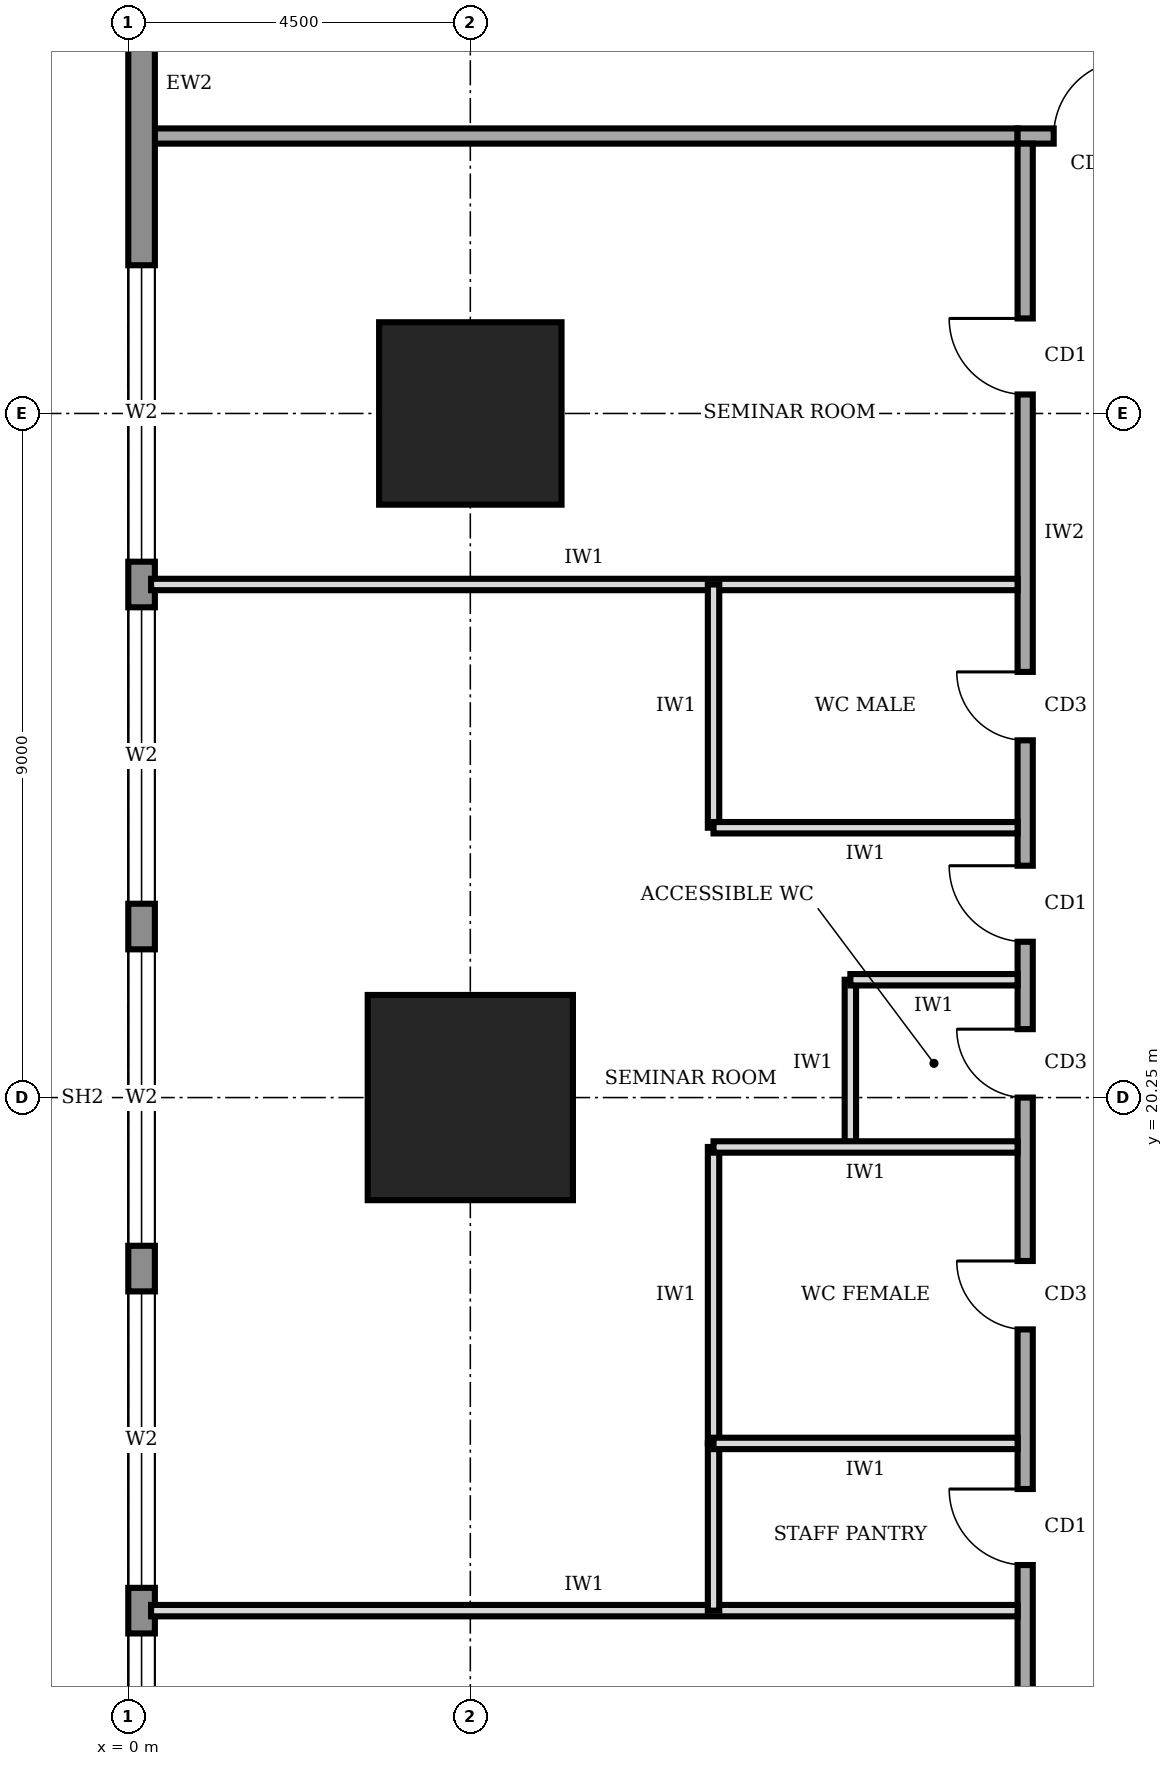
"""IFC4 building model, lengths in metres.
Left out: names, types, materials, properties, quantities, classifications, styles, units other than length and angle.
Written with IfcOpenShell. Run it as: python <this file> out.ifc"""

import sys

from ifc_helpers import new_model, si_unit, direction, frame, frame_2d, origin, origin_2d, place, context, subcontext, project, spatial, rectangle, extrude, element, fill, save


model = new_model("IFC4")
c1 = context("Model", 3, precision=1e-05, world=origin(), true_north=direction((0.0, 1.0)))
c2 = subcontext(c1, "Body", "Model", "MODEL_VIEW")
j1 = project(units=[si_unit("LENGTHUNIT", "METRE"), si_unit("PLANEANGLEUNIT", "RADIAN")], contexts=[c1])
p1 = place(None, origin())
s1 = spatial("IfcSite", under=j1, at=p1, CompositionType="ELEMENT")
p2 = place(p1, origin())
s2 = spatial("IfcBuilding", under=s1, at=p2, CompositionType="ELEMENT")
p3 = place(p2, frame((0.0, 0.0, 57.0)))
s3 = spatial("IfcBuildingStorey", under=s2, at=p3, CompositionType="ELEMENT", Elevation=57.0)
p4 = place(p3, frame((4.5, 20.25, 0.0), z_axis=(0.0, 0.0, 1.0), x_axis=(1.0, 0.0, 0.0)))
e1 = element("IfcColumn", 1, at=p4, inside=s3, PredefinedType="COLUMN", context=c2, shape_type="SweptSolid", body=[
    extrude(rectangle(XDim=2.7, YDim=2.7, at=origin_2d()), origin(), (0.0, 0.0, 1.0), 4.0),
])
p5 = place(p3, frame((4.5, 29.25, 0.0), z_axis=(0.0, 0.0, 1.0), x_axis=(1.0, 0.0, 0.0)))
e2 = element("IfcColumn", 2, at=p5, inside=s3, PredefinedType="COLUMN", context=c2, shape_type="SweptSolid", body=[
    extrude(rectangle(XDim=2.4, YDim=2.4, at=origin_2d()), origin(), (0.0, 0.0, 1.0), 4.0),
])
p6 = place(p3, frame((0.175, 35.98, 0.0), z_axis=(0.0, 0.0, 1.0), x_axis=(0.0, -1.0, 0.0)))
e3 = element("IfcWall", 3, at=p6, inside=s3, PredefinedType="STANDARD", context=c2, shape_type="SweptSolid", body=[
    extrude(rectangle(XDim=31.46, YDim=0.35, at=frame_2d((15.73, 0.0))), origin(), (0.0, 0.0, 1.0), 3.75),
])
p7 = place(p6, frame((27.21, 0.0, 0.6)))
e4 = element("IfcOpeningElement", 4, at=p7, cuts=e3, PredefinedType="OPENING", context=c2, shape_type="SweptSolid", body=[
    extrude(rectangle(XDim=3.9, YDim=2.6, at=frame_2d((1.95, 1.3))), frame((0.0, 0.185, 0.0), z_axis=(0.0, -1.0, 0.0), x_axis=(1.0, 0.0, 0.0)), (0.0, 0.0, 1.0), 0.37),
])
p8 = place(p6, frame((22.78, 0.0, 0.6)))
e5 = element("IfcOpeningElement", 5, at=p8, cuts=e3, PredefinedType="OPENING", context=c2, shape_type="SweptSolid", body=[
    extrude(rectangle(XDim=3.9, YDim=2.6, at=frame_2d((1.95, 1.3))), frame((0.0, 0.185, 0.0), z_axis=(0.0, -1.0, 0.0), x_axis=(1.0, 0.0, 0.0)), (0.0, 0.0, 1.0), 0.37),
])
p9 = place(p6, frame((18.28, 0.0, 0.6)))
e6 = element("IfcOpeningElement", 6, at=p9, cuts=e3, PredefinedType="OPENING", context=c2, shape_type="SweptSolid", body=[
    extrude(rectangle(XDim=3.9, YDim=2.6, at=frame_2d((1.95, 1.3))), frame((0.0, 0.185, 0.0), z_axis=(0.0, -1.0, 0.0), x_axis=(1.0, 0.0, 0.0)), (0.0, 0.0, 1.0), 0.37),
])
p10 = place(p6, frame((13.78, 0.0, 0.6)))
e7 = element("IfcOpeningElement", 7, at=p10, cuts=e3, PredefinedType="OPENING", context=c2, shape_type="SweptSolid", body=[
    extrude(rectangle(XDim=3.9, YDim=2.6, at=frame_2d((1.95, 1.3))), frame((0.0, 0.185, 0.0), z_axis=(0.0, -1.0, 0.0), x_axis=(1.0, 0.0, 0.0)), (0.0, 0.0, 1.0), 0.37),
])
p11 = place(p6, frame((9.28, 0.0, 0.6)))
e8 = element("IfcOpeningElement", 8, at=p11, cuts=e3, PredefinedType="OPENING", context=c2, shape_type="SweptSolid", body=[
    extrude(rectangle(XDim=3.9, YDim=2.6, at=frame_2d((1.95, 1.3))), frame((0.0, 0.185, 0.0), z_axis=(0.0, -1.0, 0.0), x_axis=(1.0, 0.0, 0.0)), (0.0, 0.0, 1.0), 0.37),
])
p12 = place(p6, frame((4.78, 0.0, 0.6)))
e9 = element("IfcOpeningElement", 9, at=p12, cuts=e3, PredefinedType="OPENING", context=c2, shape_type="SweptSolid", body=[
    extrude(rectangle(XDim=3.9, YDim=2.6, at=frame_2d((1.95, 1.3))), frame((0.0, 0.185, 0.0), z_axis=(0.0, -1.0, 0.0), x_axis=(1.0, 0.0, 0.0)), (0.0, 0.0, 1.0), 0.37),
])
p13 = place(p3, frame((28.6, 32.9, 0.0), z_axis=(0.0, 0.0, 1.0), x_axis=(-1.0, 0.0, 0.0)))
e10 = element("IfcWall", 10, at=p13, inside=s3, PredefinedType="SOLIDWALL", context=c2, shape_type="SweptSolid", body=[
    extrude(rectangle(XDim=16.9, YDim=0.2, at=frame_2d((8.45, 0.0))), origin(), (0.0, 0.0, 1.0), 3.75),
])
p14 = place(p13, frame((15.425, 0.0, 0.0)))
e11 = element("IfcOpeningElement", 11, at=p14, cuts=e10, PredefinedType="OPENING", context=c2, shape_type="SweptSolid", body=[
    extrude(rectangle(XDim=1.0, YDim=2.1, at=frame_2d((0.5, 1.05))), frame((0.0, 0.11, 0.0), z_axis=(0.0, -1.0, 0.0), x_axis=(1.0, 0.0, 0.0)), (0.0, 0.0, 1.0), 0.22),
])
p15 = place(p13, frame((12.35, 0.0, 0.0)))
e12 = element("IfcOpeningElement", 12, at=p15, cuts=e10, PredefinedType="OPENING", context=c2, shape_type="SweptSolid", body=[
    extrude(rectangle(XDim=1.0, YDim=2.1, at=frame_2d((0.5, 1.05))), frame((0.0, 0.11, 0.0), z_axis=(0.0, -1.0, 0.0), x_axis=(1.0, 0.0, 0.0)), (0.0, 0.0, 1.0), 0.22),
])
p16 = place(p13, frame((5.6, 0.0, 0.0)))
e13 = element("IfcOpeningElement", 13, at=p16, cuts=e10, PredefinedType="OPENING", context=c2, shape_type="SweptSolid", body=[
    extrude(rectangle(XDim=1.0, YDim=2.1, at=frame_2d((0.5, 1.05))), frame((0.0, 0.11, 0.0), z_axis=(0.0, -1.0, 0.0), x_axis=(1.0, 0.0, 0.0)), (0.0, 0.0, 1.0), 0.22),
])
p17 = place(p13, frame((0.275, 0.0, 0.0)))
e14 = element("IfcOpeningElement", 14, at=p17, cuts=e10, PredefinedType="OPENING", context=c2, shape_type="SweptSolid", body=[
    extrude(rectangle(XDim=1.0, YDim=2.1, at=frame_2d((0.5, 1.05))), frame((0.0, 0.11, 0.0), z_axis=(0.0, -1.0, 0.0), x_axis=(1.0, 0.0, 0.0)), (0.0, 0.0, 1.0), 0.22),
])
p18 = place(p3, frame((11.8, 32.8, 0.0), z_axis=(0.0, 0.0, 1.0), x_axis=(0.0, -1.0, 0.0)))
e15 = element("IfcWall", 15, at=p18, inside=s3, PredefinedType="SOLIDWALL", context=c2, shape_type="SweptSolid", body=[
    extrude(rectangle(XDim=23.8, YDim=0.2, at=frame_2d((11.9, 0.0))), origin(), (0.0, 0.0, 1.0), 3.75),
])
p19 = place(p18, frame((21.05, 0.0, 0.0)))
e16 = element("IfcOpeningElement", 16, at=p19, cuts=e15, PredefinedType="OPENING", context=c2, shape_type="SweptSolid", body=[
    extrude(rectangle(XDim=1.0, YDim=2.1, at=frame_2d((0.5, 1.05))), frame((0.0, 0.11, 0.0), z_axis=(0.0, -1.0, 0.0), x_axis=(1.0, 0.0, 0.0)), (0.0, 0.0, 1.0), 0.22),
])
p20 = place(p18, frame((17.7, 0.0, 0.0)))
e17 = element("IfcOpeningElement", 17, at=p20, cuts=e15, PredefinedType="OPENING", context=c2, shape_type="SweptSolid", body=[
    extrude(rectangle(XDim=1.0, YDim=2.1, at=frame_2d((0.5, 1.05))), frame((0.0, 0.11, 0.0), z_axis=(0.0, -1.0, 0.0), x_axis=(1.0, 0.0, 0.0)), (0.0, 0.0, 1.0), 0.22),
])
p21 = place(p18, frame((14.7, 0.0, 0.0)))
e18 = element("IfcOpeningElement", 18, at=p21, cuts=e15, PredefinedType="OPENING", context=c2, shape_type="SweptSolid", body=[
    extrude(rectangle(XDim=0.9, YDim=2.1, at=frame_2d((0.45, 1.05))), frame((0.0, 0.11, 0.0), z_axis=(0.0, -1.0, 0.0), x_axis=(1.0, 0.0, 0.0)), (0.0, 0.0, 1.0), 0.22),
])
p22 = place(p18, frame((11.65, 0.0, 0.0)))
e19 = element("IfcOpeningElement", 19, at=p22, cuts=e15, PredefinedType="OPENING", context=c2, shape_type="SweptSolid", body=[
    extrude(rectangle(XDim=0.9, YDim=2.1, at=frame_2d((0.45, 1.05))), frame((0.0, 0.11, 0.0), z_axis=(0.0, -1.0, 0.0), x_axis=(1.0, 0.0, 0.0)), (0.0, 0.0, 1.0), 0.22),
])
p23 = place(p18, frame((6.95, 0.0, 0.0)))
e20 = element("IfcOpeningElement", 20, at=p23, cuts=e15, PredefinedType="OPENING", context=c2, shape_type="SweptSolid", body=[
    extrude(rectangle(XDim=0.9, YDim=2.1, at=frame_2d((0.45, 1.05))), frame((0.0, 0.11, 0.0), z_axis=(0.0, -1.0, 0.0), x_axis=(1.0, 0.0, 0.0)), (0.0, 0.0, 1.0), 0.22),
])
p24 = place(p18, frame((9.5, 0.0, 0.0)))
e21 = element("IfcOpeningElement", 21, at=p24, cuts=e15, PredefinedType="OPENING", context=c2, shape_type="SweptSolid", body=[
    extrude(rectangle(XDim=1.0, YDim=2.1, at=frame_2d((0.5, 1.05))), frame((0.0, 0.11, 0.0), z_axis=(0.0, -1.0, 0.0), x_axis=(1.0, 0.0, 0.0)), (0.0, 0.0, 1.0), 0.22),
])
p25 = place(p18, frame((2.3, 0.0, 0.0)))
e22 = element("IfcOpeningElement", 22, at=p25, cuts=e15, PredefinedType="OPENING", context=c2, shape_type="SweptSolid", body=[
    extrude(rectangle(XDim=1.0, YDim=2.1, at=frame_2d((0.5, 1.05))), frame((0.0, 0.11, 0.0), z_axis=(0.0, -1.0, 0.0), x_axis=(1.0, 0.0, 0.0)), (0.0, 0.0, 1.0), 0.22),
])
p26 = place(p3, frame((0.3, 32.9, 0.0), z_axis=(0.0, 0.0, 1.0), x_axis=(1.0, 0.0, 0.0)))
e23 = element("IfcWall", 23, at=p26, inside=s3, PredefinedType="SOLIDWALL", context=c2, shape_type="SweptSolid", body=[
    extrude(rectangle(XDim=11.4, YDim=0.2, at=frame_2d((5.7, 0.0))), origin(), (0.0, 0.0, 1.0), 3.75),
])
for number, where, z_axis, x_axis in (
    (24, (0.3, 13.5, 0.0), (0.0, 0.0, 1.0), (1.0, 0.0, 0.0)),
    (25, (0.3, 27.0, 0.0), (0.0, 0.0, 1.0), (1.0, 0.0, 0.0)),
):
    element("IfcWall", number, at=place(p3, frame(where, z_axis=z_axis, x_axis=x_axis)), inside=s3, PredefinedType="PARTITIONING", context=c2, shape_type="SweptSolid", body=[
        extrude(rectangle(XDim=11.4, YDim=0.15, at=frame_2d((5.7, 0.0))), origin(), (0.0, 0.0, 1.0), 3.75),
    ])
p27 = place(p3, frame((11.7, 15.7, 0.0), z_axis=(0.0, 0.0, 1.0), x_axis=(-1.0, 0.0, 0.0)))
e26 = element("IfcWall", 26, at=p27, inside=s3, PredefinedType="PARTITIONING", context=c2, shape_type="SweptSolid", body=[
    extrude(rectangle(XDim=4.0, YDim=0.15, at=frame_2d((2.0, 0.0))), origin(), (0.0, 0.0, 1.0), 3.75),
])
p28 = place(p3, frame((11.7, 19.6, 0.0), z_axis=(0.0, 0.0, 1.0), x_axis=(-1.0, 0.0, 0.0)))
e27 = element("IfcWall", 27, at=p28, inside=s3, PredefinedType="PARTITIONING", context=c2, shape_type="SweptSolid", body=[
    extrude(rectangle(XDim=4.0, YDim=0.15, at=frame_2d((2.0, 0.0))), origin(), (0.0, 0.0, 1.0), 2.85),
])
p29 = place(p3, frame((11.7, 21.8, 0.0), z_axis=(0.0, 0.0, 1.0), x_axis=(-1.0, 0.0, 0.0)))
e28 = element("IfcWall", 28, at=p29, inside=s3, PredefinedType="PARTITIONING", context=c2, shape_type="SweptSolid", body=[
    extrude(rectangle(XDim=2.2, YDim=0.15, at=frame_2d((1.1, 0.0))), origin(), (0.0, 0.0, 1.0), 3.75),
])
p30 = place(p3, frame((11.7, 23.8, 0.0), z_axis=(0.0, 0.0, 1.0), x_axis=(-1.0, 0.0, 0.0)))
e29 = element("IfcWall", 29, at=p30, inside=s3, PredefinedType="PARTITIONING", context=c2, shape_type="SweptSolid", body=[
    extrude(rectangle(XDim=4.0, YDim=0.15, at=frame_2d((2.0, 0.0))), origin(), (0.0, 0.0, 1.0), 3.75),
])
p31 = place(p3, frame((7.7, 13.5, 0.0), z_axis=(0.0, 0.0, 1.0), x_axis=(0.0, 1.0, 0.0)))
e30 = element("IfcWall", 30, at=p31, inside=s3, PredefinedType="PARTITIONING", context=c2, shape_type="SweptSolid", body=[
    extrude(rectangle(XDim=2.2, YDim=0.15, at=frame_2d((1.1, 0.0))), origin(), (0.0, 0.0, 1.0), 3.75),
])
p32 = place(p3, frame((7.7, 15.7, 0.0), z_axis=(0.0, 0.0, 1.0), x_axis=(0.0, 1.0, 0.0)))
e31 = element("IfcWall", 31, at=p32, inside=s3, PredefinedType="PARTITIONING", context=c2, shape_type="SweptSolid", body=[
    extrude(rectangle(XDim=3.9, YDim=0.15, at=frame_2d((1.95, 0.0))), origin(), (0.0, 0.0, 1.0), 3.75),
])
p33 = place(p3, frame((9.5, 19.6, 0.0), z_axis=(0.0, 0.0, 1.0), x_axis=(0.0, 1.0, 0.0)))
e32 = element("IfcWall", 32, at=p33, inside=s3, PredefinedType="PARTITIONING", context=c2, shape_type="SweptSolid", body=[
    extrude(rectangle(XDim=2.2, YDim=0.15, at=frame_2d((1.1, 0.0))), origin(), (0.0, 0.0, 1.0), 3.75),
])
p34 = place(p3, frame((7.7, 23.8, 0.0), z_axis=(0.0, 0.0, 1.0), x_axis=(0.0, 1.0, 0.0)))
e33 = element("IfcWall", 33, at=p34, inside=s3, PredefinedType="PARTITIONING", context=c2, shape_type="SweptSolid", body=[
    extrude(rectangle(XDim=3.2, YDim=0.15, at=frame_2d((1.6, 0.0))), origin(), (0.0, 0.0, 1.0), 3.75),
])
p35 = place(p8, origin())
e34 = element("IfcWindow", 34, at=p35, inside=s3, PartitioningType="SINGLE_PANEL", PredefinedType="WINDOW", context=c2, shape_type="SweptSolid", body=[
    extrude(rectangle(XDim=3.9, YDim=2.6, at=frame_2d((1.95, 1.3))), frame((0.0, 0.03, 0.0), z_axis=(0.0, -1.0, 0.0), x_axis=(1.0, 0.0, 0.0)), (0.0, 0.0, 1.0), 0.06),
])
fill(e5, e34)
p36 = place(p9, origin())
e35 = element("IfcWindow", 35, at=p36, inside=s3, PartitioningType="SINGLE_PANEL", PredefinedType="WINDOW", context=c2, shape_type="SweptSolid", body=[
    extrude(rectangle(XDim=3.9, YDim=2.6, at=frame_2d((1.95, 1.3))), frame((0.0, 0.03, 0.0), z_axis=(0.0, -1.0, 0.0), x_axis=(1.0, 0.0, 0.0)), (0.0, 0.0, 1.0), 0.06),
])
fill(e6, e35)
p37 = place(p10, origin())
e36 = element("IfcWindow", 36, at=p37, inside=s3, PartitioningType="SINGLE_PANEL", PredefinedType="WINDOW", context=c2, shape_type="SweptSolid", body=[
    extrude(rectangle(XDim=3.9, YDim=2.6, at=frame_2d((1.95, 1.3))), frame((0.0, 0.03, 0.0), z_axis=(0.0, -1.0, 0.0), x_axis=(1.0, 0.0, 0.0)), (0.0, 0.0, 1.0), 0.06),
])
fill(e7, e36)
p38 = place(p11, origin())
e37 = element("IfcWindow", 37, at=p38, inside=s3, PartitioningType="SINGLE_PANEL", PredefinedType="WINDOW", context=c2, shape_type="SweptSolid", body=[
    extrude(rectangle(XDim=3.9, YDim=2.6, at=frame_2d((1.95, 1.3))), frame((0.0, 0.03, 0.0), z_axis=(0.0, -1.0, 0.0), x_axis=(1.0, 0.0, 0.0)), (0.0, 0.0, 1.0), 0.06),
])
fill(e8, e37)
p39 = place(p12, origin())
e38 = element("IfcWindow", 38, at=p39, inside=s3, PartitioningType="SINGLE_PANEL", PredefinedType="WINDOW", context=c2, shape_type="SweptSolid", body=[
    extrude(rectangle(XDim=3.9, YDim=2.6, at=frame_2d((1.95, 1.3))), frame((0.0, 0.03, 0.0), z_axis=(0.0, -1.0, 0.0), x_axis=(1.0, 0.0, 0.0)), (0.0, 0.0, 1.0), 0.06),
])
fill(e9, e38)
p40 = place(p14, frame((1.0, 0.0, 0.0), z_axis=(0.0, 0.0, 1.0), x_axis=(-1.0, 0.0, 0.0)))
e39 = element("IfcDoor", 39, at=p40, inside=s3, OperationType="SINGLE_SWING_RIGHT", PredefinedType="DOOR", context=c2, shape_type="SweptSolid", body=[
    extrude(rectangle(XDim=1.0, YDim=2.1, at=frame_2d((0.5, 1.05))), frame((0.0, 0.025, 0.0), z_axis=(0.0, -1.0, 0.0), x_axis=(1.0, 0.0, 0.0)), (0.0, 0.0, 1.0), 0.05),
])
fill(e11, e39)
p41 = place(p20, frame((1.0, 0.0, 0.0), z_axis=(0.0, 0.0, 1.0), x_axis=(-1.0, 0.0, 0.0)))
e40 = element("IfcDoor", 40, at=p41, inside=s3, OperationType="SINGLE_SWING_RIGHT", PredefinedType="DOOR", context=c2, shape_type="SweptSolid", body=[
    extrude(rectangle(XDim=1.0, YDim=2.1, at=frame_2d((0.5, 1.05))), frame((0.0, 0.025, 0.0), z_axis=(0.0, -1.0, 0.0), x_axis=(1.0, 0.0, 0.0)), (0.0, 0.0, 1.0), 0.05),
])
fill(e17, e40)
p42 = place(p21, frame((0.9, 0.0, 0.0), z_axis=(0.0, 0.0, 1.0), x_axis=(-1.0, 0.0, 0.0)))
e41 = element("IfcDoor", 41, at=p42, inside=s3, OperationType="SINGLE_SWING_RIGHT", PredefinedType="DOOR", context=c2, shape_type="SweptSolid", body=[
    extrude(rectangle(XDim=0.9, YDim=2.1, at=frame_2d((0.45, 1.05))), frame((0.0, 0.025, 0.0), z_axis=(0.0, -1.0, 0.0), x_axis=(1.0, 0.0, 0.0)), (0.0, 0.0, 1.0), 0.05),
])
fill(e18, e41)
p43 = place(p22, frame((0.9, 0.0, 0.0), z_axis=(0.0, 0.0, 1.0), x_axis=(-1.0, 0.0, 0.0)))
e42 = element("IfcDoor", 42, at=p43, inside=s3, OperationType="SINGLE_SWING_RIGHT", PredefinedType="DOOR", context=c2, shape_type="SweptSolid", body=[
    extrude(rectangle(XDim=0.9, YDim=2.1, at=frame_2d((0.45, 1.05))), frame((0.0, 0.025, 0.0), z_axis=(0.0, -1.0, 0.0), x_axis=(1.0, 0.0, 0.0)), (0.0, 0.0, 1.0), 0.05),
])
fill(e19, e42)
p44 = place(p23, frame((0.9, 0.0, 0.0), z_axis=(0.0, 0.0, 1.0), x_axis=(-1.0, 0.0, 0.0)))
e43 = element("IfcDoor", 43, at=p44, inside=s3, OperationType="SINGLE_SWING_RIGHT", PredefinedType="DOOR", context=c2, shape_type="SweptSolid", body=[
    extrude(rectangle(XDim=0.9, YDim=2.1, at=frame_2d((0.45, 1.05))), frame((0.0, 0.025, 0.0), z_axis=(0.0, -1.0, 0.0), x_axis=(1.0, 0.0, 0.0)), (0.0, 0.0, 1.0), 0.05),
])
fill(e20, e43)
p45 = place(p24, frame((1.0, 0.0, 0.0), z_axis=(0.0, 0.0, 1.0), x_axis=(-1.0, 0.0, 0.0)))
e44 = element("IfcDoor", 44, at=p45, inside=s3, OperationType="SINGLE_SWING_RIGHT", PredefinedType="DOOR", context=c2, shape_type="SweptSolid", body=[
    extrude(rectangle(XDim=1.0, YDim=2.1, at=frame_2d((0.5, 1.05))), frame((0.0, 0.025, 0.0), z_axis=(0.0, -1.0, 0.0), x_axis=(1.0, 0.0, 0.0)), (0.0, 0.0, 1.0), 0.05),
])
fill(e21, e44)
p46 = place(p25, frame((1.0, 0.0, 0.0), z_axis=(0.0, 0.0, 1.0), x_axis=(-1.0, 0.0, 0.0)))
e45 = element("IfcDoor", 45, at=p46, inside=s3, OperationType="SINGLE_SWING_RIGHT", PredefinedType="DOOR", context=c2, shape_type="SweptSolid", body=[
    extrude(rectangle(XDim=1.0, YDim=2.1, at=frame_2d((0.5, 1.05))), frame((0.0, 0.025, 0.0), z_axis=(0.0, -1.0, 0.0), x_axis=(1.0, 0.0, 0.0)), (0.0, 0.0, 1.0), 0.05),
])
fill(e22, e45)
save(model, sys.argv[1])
